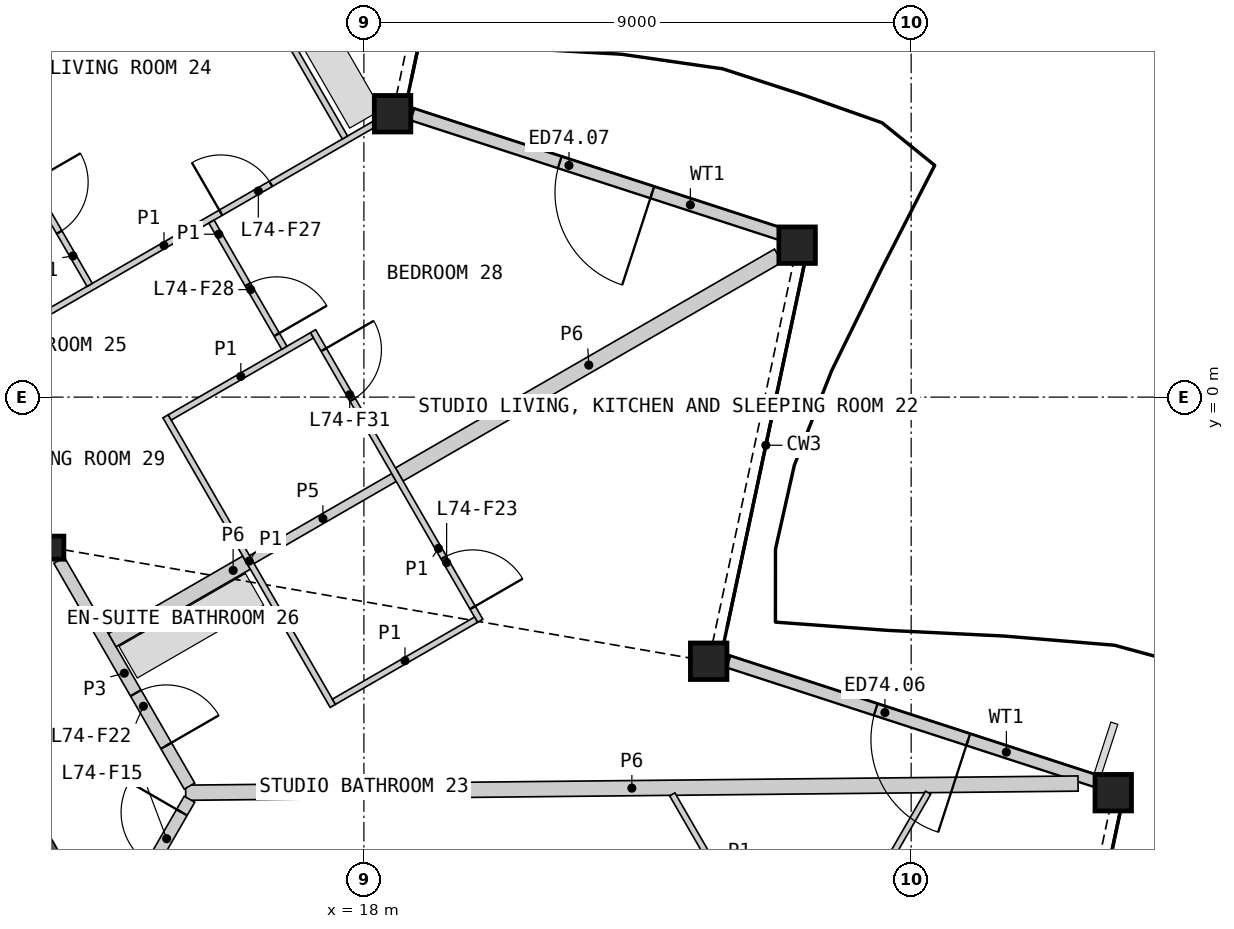
"""IFC4 building model, lengths in metres.
Left out: names, types, materials, properties, quantities, classifications, styles, units other than length and angle.
Written with IfcOpenShell. Run it as: python <this file> out.ifc"""

import sys

from ifc_helpers import new_model, si_unit, direction, frame, frame_2d, origin, origin_2d, place, context, subcontext, project, spatial, polyline, rectangle, hollow_rectangle, i_section, outline, extrude, element, fill, save


model = new_model("IFC4")
c1 = context("Model", 3, precision=1e-05, world=origin(), true_north=direction((0.0, 1.0)))
c2 = subcontext(c1, "Body", "Model", "MODEL_VIEW")
j1 = project(units=[si_unit("LENGTHUNIT", "METRE"), si_unit("PLANEANGLEUNIT", "RADIAN")], contexts=[c1])
p1 = place(None, origin())
s1 = spatial("IfcSite", under=j1, at=p1, CompositionType="ELEMENT")
p2 = place(p1, origin())
s2 = spatial("IfcBuilding", under=s1, at=p2, CompositionType="ELEMENT")
p3 = place(p2, frame((0.0, 0.0, 332.4)))
s3 = spatial("IfcBuildingStorey", under=s2, at=p3, CompositionType="ELEMENT", Elevation=332.4)
for number, where, z_axis, x_axis in (
    (1, (30.324, -6.506, 0.0), (0.0, 0.0, 1.0), (1.0, 0.0, 0.0)),
    (2, (23.67, -4.344, 0.0), (0.0, 0.0, 1.0), (1.0, 0.0, 0.0)),
    (3, (25.125, 2.499, 0.0), (0.0, 0.0, 1.0), (1.0, 0.0, 0.0)),
    (4, (18.471, 4.661, 0.0), (0.0, 0.0, 1.0), (1.0, 0.0, 0.0)),
):
    element("IfcColumn", number, at=place(p3, frame(where, z_axis=z_axis, x_axis=x_axis)), inside=s3, PredefinedType="COLUMN", context=c2, shape_type="SweptSolid", body=[
        extrude(hollow_rectangle(XDim=0.6, YDim=0.6, WallThickness=0.04, at=origin_2d()), origin(), (0.0, 0.0, 1.0), 3.4),
    ])
p4 = place(p3, frame((12.868, -2.476, 0.0), z_axis=(0.0, 0.0, 1.0), x_axis=(1.0, 0.0, 0.0)))
e5 = element("IfcColumn", 5, at=p4, inside=s3, PredefinedType="COLUMN", context=c2, shape_type="SweptSolid", body=[
    extrude(i_section(OverallWidth=0.396, OverallDepth=0.381, WebThickness=0.019, FlangeThickness=0.03, at=origin_2d()), origin(), (0.0, 0.0, 1.0), 3.4),
])
p5 = place(p3, frame((30.09, -6.333, 0.0), z_axis=(0.0, 0.0, 1.0), x_axis=(-0.951048625867, 0.309041277561, 0.0)))
e6 = element("IfcWall", 6, at=p5, inside=s3, PredefinedType="SOLIDWALL", context=c2, shape_type="SweptSolid", body=[
    extrude(rectangle(XDim=6.408, YDim=0.2, at=frame_2d((3.204, 0.0))), origin(), (0.0, 0.0, 1.0), 2.488),
])
p6 = place(p5, frame((2.262, 0.0, 0.0)))
e7 = element("IfcOpeningElement", 7, at=p6, cuts=e6, PredefinedType="OPENING", context=c2, shape_type="SweptSolid", body=[
    extrude(rectangle(XDim=1.6, YDim=2.25, at=frame_2d((0.8, 1.125))), frame((0.0, 0.11, 0.0), z_axis=(0.0, -1.0, 0.0), x_axis=(1.0, 0.0, 0.0)), (0.0, 0.0, 1.0), 0.22),
])
p7 = place(p3, frame((24.893, 2.667, 0.0), z_axis=(0.0, 0.0, 1.0), x_axis=(-0.951058691075, 0.309010301012, 0.0)))
e8 = element("IfcWall", 8, at=p7, inside=s3, PredefinedType="SOLIDWALL", context=c2, shape_type="SweptSolid", body=[
    extrude(rectangle(XDim=6.411, YDim=0.2, at=frame_2d((3.206, 0.0))), origin(), (0.0, 0.0, 1.0), 2.488),
])
p8 = place(p7, frame((2.262, 0.0, 0.0)))
e9 = element("IfcOpeningElement", 9, at=p8, cuts=e8, PredefinedType="OPENING", context=c2, shape_type="SweptSolid", body=[
    extrude(rectangle(XDim=1.6, YDim=2.25, at=frame_2d((0.8, 1.125))), frame((0.0, 0.11, 0.0), z_axis=(0.0, -1.0, 0.0), x_axis=(1.0, 0.0, 0.0)), (0.0, 0.0, 1.0), 0.22),
])
p9 = place(p3, origin())
e10 = element("IfcWall", 10, at=p9, inside=s3, PredefinedType="SHEAR", context=c2, shape_type="SweptSolid", body=[
    extrude(outline(polyline([(11.961, -7.506), (11.961, -6.906), (12.48, -6.606), (13.0, -7.506), (11.961, -7.506)])), origin(), (0.0, 0.0, 1.0), 3.1),
])
p10 = place(p3, frame((15.069, -6.507, 0.0), z_axis=(0.0, 0.0, 1.0), x_axis=(0.999946985532, 0.010296898856, 0.0)))
e11 = element("IfcWall", 11, at=p10, inside=s3, PredefinedType="PARTITIONING", context=c2, shape_type="SweptSolid", body=[
    extrude(rectangle(XDim=14.677, YDim=0.25, at=frame_2d((7.338, 0.0))), origin(), (0.0, 0.0, 1.0), 2.33),
])
p11 = place(p3, frame((18.581, -1.272, 0.0), z_axis=(0.0, 0.0, 1.0), x_axis=(0.866024038922, 0.500002364004, 0.0)))
e12 = element("IfcWall", 12, at=p11, inside=s3, PredefinedType="PARTITIONING", context=c2, shape_type="SweptSolid", body=[
    extrude(rectangle(XDim=7.198, YDim=0.25, at=frame_2d((3.599, 0.0))), origin(), (0.0, 0.0, 1.0), 2.33),
])
p12 = place(p3, frame((12.988, -2.684, 0.0), z_axis=(0.0, 0.0, 1.0), x_axis=(0.500003406062, -0.866023437285, 0.0)))
e13 = element("IfcWall", 13, at=p12, inside=s3, PredefinedType="PARTITIONING", context=c2, shape_type="SweptSolid", body=[
    extrude(rectangle(XDim=4.288, YDim=0.2, at=frame_2d((2.144, 0.0))), origin(), (0.0, 0.0, 1.0), 3.1),
])
p13 = place(p12, frame((2.521, 0.0, 0.0)))
e14 = element("IfcOpeningElement", 14, at=p13, cuts=e13, PredefinedType="OPENING", context=c2, shape_type="SweptSolid", body=[
    extrude(rectangle(XDim=1.0, YDim=2.1, at=frame_2d((0.5, 1.05))), frame((0.0, 0.11, 0.0), z_axis=(0.0, -1.0, 0.0), x_axis=(1.0, 0.0, 0.0)), (0.0, 0.0, 1.0), 0.22),
])
p14 = place(p3, frame((13.293, -9.797, 0.0), z_axis=(0.0, 0.0, 1.0), x_axis=(0.499967746641, 0.866044024469, 0.0)))
e15 = element("IfcWall", 15, at=p14, inside=s3, PredefinedType="PARTITIONING", context=c2, shape_type="SweptSolid", body=[
    extrude(rectangle(XDim=3.676, YDim=0.2, at=frame_2d((1.838, 0.0))), origin(), (0.0, 0.0, 1.0), 3.1),
])
p15 = place(p14, frame((2.426, 0.0, 0.0)))
e16 = element("IfcOpeningElement", 16, at=p15, cuts=e15, PredefinedType="OPENING", context=c2, shape_type="SweptSolid", body=[
    extrude(rectangle(XDim=1.0, YDim=2.1, at=frame_2d((0.5, 1.05))), frame((0.0, 0.11, 0.0), z_axis=(0.0, -1.0, 0.0), x_axis=(1.0, 0.0, 0.0)), (0.0, 0.0, 1.0), 0.22),
])
p16 = place(p3, frame((13.861, -3.997, 0.0), z_axis=(0.0, 0.0, 1.0), x_axis=(0.866030925526, 0.499990435942, 0.0)))
e17 = element("IfcWall", 17, at=p16, inside=s3, PredefinedType="PARTITIONING", context=c2, shape_type="SweptSolid", body=[
    extrude(rectangle(XDim=2.55, YDim=0.25, at=frame_2d((1.275, 0.0))), origin(), (0.0, 0.0, 1.0), 2.33),
])
p17 = place(p3, frame((16.156, -2.672, 0.0), z_axis=(0.0, 0.0, 1.0), x_axis=(0.866059108428, 0.4999416173, 0.0)))
e18 = element("IfcWall", 18, at=p17, inside=s3, PredefinedType="PLUMBINGWALL", context=c2, shape_type="SweptSolid", body=[
    extrude(rectangle(XDim=2.7, YDim=0.15, at=frame_2d((1.35, 0.0))), origin(), (0.0, 0.0, 1.0), 2.33),
])
p18 = place(p3, frame((8.786, 5.073, 0.0), z_axis=(0.0, 0.0, 1.0), x_axis=(0.86602139559, 0.500006942333, 0.0)))
e19 = element("IfcWall", 19, at=p18, inside=s3, PredefinedType="PARTITIONING", context=c2, shape_type="SweptSolid", body=[
    extrude(rectangle(XDim=12.505, YDim=0.1, at=frame_2d((6.252, 0.0))), origin(), (0.0, 0.0, 1.0), 2.33),
])
p19 = place(p18, frame((5.275, 0.0, 0.0)))
e20 = element("IfcOpeningElement", 20, at=p19, cuts=e19, PredefinedType="OPENING", context=c2, shape_type="SweptSolid", body=[
    extrude(rectangle(XDim=0.95, YDim=2.1, at=frame_2d((0.475, 1.05))), frame((0.0, 0.06, 0.0), z_axis=(0.0, -1.0, 0.0), x_axis=(1.0, 0.0, 0.0)), (0.0, 0.0, 1.0), 0.12),
])
p20 = place(p3, frame((11.263, 0.503, 0.0), z_axis=(0.0, 0.0, 1.0), x_axis=(0.866023773276, 0.500002824113, 0.0)))
e21 = element("IfcWall", 21, at=p20, inside=s3, PredefinedType="PARTITIONING", context=c2, shape_type="SweptSolid", body=[
    extrude(rectangle(XDim=7.965, YDim=0.1, at=frame_2d((3.982, 0.0))), origin(), (0.0, 0.0, 1.0), 2.33),
])
p21 = place(p20, frame((5.061, 0.0, 0.0)))
e22 = element("IfcOpeningElement", 22, at=p21, cuts=e21, PredefinedType="OPENING", context=c2, shape_type="SweptSolid", body=[
    extrude(rectangle(XDim=0.95, YDim=2.1, at=frame_2d((0.475, 1.05))), frame((0.0, 0.06, 0.0), z_axis=(0.0, -1.0, 0.0), x_axis=(1.0, 0.0, 0.0)), (0.0, 0.0, 1.0), 0.12),
])
p22 = place(p3, frame((23.301, -13.395, 0.0), z_axis=(0.0, 0.0, 1.0), x_axis=(0.500017325895, 0.866015400443, 0.0)))
e23 = element("IfcWall", 23, at=p22, inside=s3, PredefinedType="PARTITIONING", context=c2, shape_type="SweptSolid", body=[
    extrude(rectangle(XDim=7.955, YDim=0.1, at=frame_2d((3.978, 0.0))), origin(), (0.0, 0.0, 1.0), 2.33),
])
p23 = place(p22, frame((1.951, 0.0, 0.0)))
e24 = element("IfcOpeningElement", 24, at=p23, cuts=e23, PredefinedType="OPENING", context=c2, shape_type="SweptSolid", body=[
    extrude(rectangle(XDim=0.95, YDim=2.1, at=frame_2d((0.475, 1.05))), frame((0.0, 0.06, 0.0), z_axis=(0.0, -1.0, 0.0), x_axis=(1.0, 0.0, 0.0)), (0.0, 0.0, 1.0), 0.12),
])
p24 = place(p3, frame((14.738, -0.316, 0.0), z_axis=(0.0, 0.0, 1.0), x_axis=(0.499996545922, -0.866027397988, 0.0)))
e25 = element("IfcWall", 25, at=p24, inside=s3, PredefinedType="PARTITIONING", context=c2, shape_type="SweptSolid", body=[
    extrude(rectangle(XDim=5.5, YDim=0.1, at=frame_2d((2.75, 0.0))), origin(), (0.0, 0.0, 1.0), 2.33),
])
p25 = place(p3, frame((17.163, 1.084, 0.0), z_axis=(0.0, 0.0, 1.0), x_axis=(0.500015767406, -0.866016300277, 0.0)))
e26 = element("IfcWall", 26, at=p25, inside=s3, PredefinedType="PARTITIONING", context=c2, shape_type="SweptSolid", body=[
    extrude(rectangle(XDim=5.5, YDim=0.1, at=frame_2d((2.75, 0.0))), origin(), (0.0, 0.0, 1.0), 2.33),
])
p26 = place(p25, frame((4.3, 0.0, 0.0)))
e27 = element("IfcOpeningElement", 27, at=p26, cuts=e26, PredefinedType="OPENING", context=c2, shape_type="SweptSolid", body=[
    extrude(rectangle(XDim=0.95, YDim=2.1, at=frame_2d((0.475, 1.05))), frame((0.0, 0.06, 0.0), z_axis=(0.0, -1.0, 0.0), x_axis=(1.0, 0.0, 0.0)), (0.0, 0.0, 1.0), 0.12),
])
p27 = place(p25, frame((0.351, 0.0, 0.0)))
e28 = element("IfcOpeningElement", 28, at=p27, cuts=e26, PredefinedType="OPENING", context=c2, shape_type="SweptSolid", body=[
    extrude(rectangle(XDim=0.95, YDim=2.1, at=frame_2d((0.475, 1.05))), frame((0.0, 0.06, 0.0), z_axis=(0.0, -1.0, 0.0), x_axis=(1.0, 0.0, 0.0)), (0.0, 0.0, 1.0), 0.12),
])
p28 = place(p3, frame((15.14, 8.683, 0.0), z_axis=(0.0, 0.0, 1.0), x_axis=(0.499987849973, -0.866032418492, 0.0)))
e29 = element("IfcWall", 29, at=p28, inside=s3, PredefinedType="PARTITIONING", context=c2, shape_type="SweptSolid", body=[
    extrude(rectangle(XDim=5.096, YDim=0.1, at=frame_2d((2.548, 0.0))), origin(), (0.0, 0.0, 1.0), 2.33),
])
p29 = place(p28, frame((0.554, 0.0, 0.0)))
e30 = element("IfcOpeningElement", 30, at=p29, cuts=e29, PredefinedType="OPENING", context=c2, shape_type="SweptSolid", body=[
    extrude(rectangle(XDim=0.95, YDim=2.1, at=frame_2d((0.475, 1.05))), frame((0.0, 0.06, 0.0), z_axis=(0.0, -1.0, 0.0), x_axis=(1.0, 0.0, 0.0)), (0.0, 0.0, 1.0), 0.12),
])
p30 = place(p3, frame((23.072, -6.533, 0.0), z_axis=(0.0, 0.0, 1.0), x_axis=(0.500009026289, -0.866020192391, 0.0)))
e31 = element("IfcWall", 31, at=p30, inside=s3, PredefinedType="PARTITIONING", context=c2, shape_type="SweptSolid", body=[
    extrude(rectangle(XDim=2.999, YDim=0.1, at=frame_2d((1.5, 0.0))), origin(), (0.0, 0.0, 1.0), 2.33),
])
for number, where, z_axis, x_axis in (
    (32, (17.506, -5.011, 0.0), (0.0, 0.0, 1.0), (0.866, 0.5, 0.0)),
    (33, (14.806, -0.334, 0.0), (0.0, 0.0, 1.0), (0.866, 0.5, 0.0)),
):
    element("IfcWall", number, at=place(p3, frame(where, z_axis=z_axis, x_axis=x_axis)), inside=s3, PredefinedType="PARTITIONING", context=c2, shape_type="SweptSolid", body=[
        extrude(rectangle(XDim=2.7, YDim=0.1, at=frame_2d((1.35, 0.0))), origin(), (0.0, 0.0, 1.0), 2.33),
    ])
p31 = place(p3, frame((15.493, 2.887, 0.0), z_axis=(0.0, 0.0, 1.0), x_axis=(0.499963527173, -0.866046460357, 0.0)))
e34 = element("IfcWall", 34, at=p31, inside=s3, PredefinedType="PARTITIONING", context=c2, shape_type="SweptSolid", body=[
    extrude(rectangle(XDim=2.396, YDim=0.1, at=frame_2d((1.198, 0.0))), origin(), (0.0, 0.0, 1.0), 2.33),
])
p32 = place(p31, frame((1.196, 0.0, 0.0)))
e35 = element("IfcOpeningElement", 35, at=p32, cuts=e34, PredefinedType="OPENING", context=c2, shape_type="SweptSolid", body=[
    extrude(rectangle(XDim=0.95, YDim=2.1, at=frame_2d((0.475, 1.05))), frame((0.0, 0.06, 0.0), z_axis=(0.0, -1.0, 0.0), x_axis=(1.0, 0.0, 0.0)), (0.0, 0.0, 1.0), 0.12),
])
p33 = place(p3, frame((12.39, 3.751, 0.0), z_axis=(0.0, 0.0, 1.0), x_axis=(0.50002983664, -0.866008176907, 0.0)))
e36 = element("IfcWall", 36, at=p33, inside=s3, PredefinedType="PARTITIONING", context=c2, shape_type="SweptSolid", body=[
    extrude(rectangle(XDim=2.2, YDim=0.1, at=frame_2d((1.1, 0.0))), origin(), (0.0, 0.0, 1.0), 2.33),
])
p34 = place(p33, frame((0.25, 0.0, 0.0)))
e37 = element("IfcOpeningElement", 37, at=p34, cuts=e36, PredefinedType="OPENING", context=c2, shape_type="SweptSolid", body=[
    extrude(rectangle(XDim=0.95, YDim=2.1, at=frame_2d((0.475, 1.05))), frame((0.0, 0.06, 0.0), z_axis=(0.0, -1.0, 0.0), x_axis=(1.0, 0.0, 0.0)), (0.0, 0.0, 1.0), 0.12),
])
p35 = place(p6, origin())
e38 = element("IfcDoor", 38, at=p35, inside=s3, OperationType="DOUBLE_DOOR_SINGLE_SWING", PredefinedType="DOOR", context=c2, shape_type="SweptSolid", body=[
    extrude(rectangle(XDim=1.6, YDim=2.25, at=frame_2d((0.8, 1.125))), frame((0.0, 0.025, 0.0), z_axis=(0.0, -1.0, 0.0), x_axis=(1.0, 0.0, 0.0)), (0.0, 0.0, 1.0), 0.05),
])
fill(e7, e38)
p36 = place(p8, origin())
e39 = element("IfcDoor", 39, at=p36, inside=s3, OperationType="DOUBLE_DOOR_SINGLE_SWING", PredefinedType="DOOR", context=c2, shape_type="SweptSolid", body=[
    extrude(rectangle(XDim=1.6, YDim=2.25, at=frame_2d((0.8, 1.125))), frame((0.0, 0.025, 0.0), z_axis=(0.0, -1.0, 0.0), x_axis=(1.0, 0.0, 0.0)), (0.0, 0.0, 1.0), 0.05),
])
fill(e9, e39)
p37 = place(p15, origin())
e40 = element("IfcDoor", 40, at=p37, inside=s3, OperationType="SINGLE_SWING_RIGHT", PredefinedType="DOOR", context=c2, shape_type="SweptSolid", body=[
    extrude(rectangle(XDim=1.0, YDim=2.1, at=frame_2d((0.5, 1.05))), frame((0.0, 0.025, 0.0), z_axis=(0.0, -1.0, 0.0), x_axis=(1.0, 0.0, 0.0)), (0.0, 0.0, 1.0), 0.05),
])
fill(e16, e40)
p38 = place(p13, origin())
e41 = element("IfcDoor", 41, at=p38, inside=s3, OperationType="SINGLE_SWING_RIGHT", PredefinedType="DOOR", context=c2, shape_type="SweptSolid", body=[
    extrude(rectangle(XDim=1.0, YDim=2.1, at=frame_2d((0.5, 1.05))), frame((0.0, 0.025, 0.0), z_axis=(0.0, -1.0, 0.0), x_axis=(1.0, 0.0, 0.0)), (0.0, 0.0, 1.0), 0.05),
])
fill(e14, e41)
p39 = place(p26, origin())
e42 = element("IfcDoor", 42, at=p39, inside=s3, OperationType="SINGLE_SWING_RIGHT", PredefinedType="DOOR", context=c2, shape_type="SweptSolid", body=[
    extrude(rectangle(XDim=0.95, YDim=2.1, at=frame_2d((0.475, 1.05))), frame((0.0, 0.025, 0.0), z_axis=(0.0, -1.0, 0.0), x_axis=(1.0, 0.0, 0.0)), (0.0, 0.0, 1.0), 0.05),
])
fill(e27, e42)
p40 = place(p34, origin())
e43 = element("IfcDoor", 43, at=p40, inside=s3, OperationType="SINGLE_SWING_LEFT", PredefinedType="DOOR", context=c2, shape_type="SweptSolid", body=[
    extrude(rectangle(XDim=0.95, YDim=2.1, at=frame_2d((0.475, 1.05))), frame((0.0, 0.025, 0.0), z_axis=(0.0, -1.0, 0.0), x_axis=(1.0, 0.0, 0.0)), (0.0, 0.0, 1.0), 0.05),
])
fill(e37, e43)
p41 = place(p21, origin())
e44 = element("IfcDoor", 44, at=p41, inside=s3, OperationType="SINGLE_SWING_LEFT", PredefinedType="DOOR", context=c2, shape_type="SweptSolid", body=[
    extrude(rectangle(XDim=0.95, YDim=2.1, at=frame_2d((0.475, 1.05))), frame((0.0, 0.025, 0.0), z_axis=(0.0, -1.0, 0.0), x_axis=(1.0, 0.0, 0.0)), (0.0, 0.0, 1.0), 0.05),
])
fill(e22, e44)
p42 = place(p32, origin())
e45 = element("IfcDoor", 45, at=p42, inside=s3, OperationType="SINGLE_SWING_RIGHT", PredefinedType="DOOR", context=c2, shape_type="SweptSolid", body=[
    extrude(rectangle(XDim=0.95, YDim=2.1, at=frame_2d((0.475, 1.05))), frame((0.0, 0.025, 0.0), z_axis=(0.0, -1.0, 0.0), x_axis=(1.0, 0.0, 0.0)), (0.0, 0.0, 1.0), 0.05),
])
fill(e35, e45)
p43 = place(p27, origin())
e46 = element("IfcDoor", 46, at=p43, inside=s3, OperationType="SINGLE_SWING_LEFT", PredefinedType="DOOR", context=c2, shape_type="SweptSolid", body=[
    extrude(rectangle(XDim=0.95, YDim=2.1, at=frame_2d((0.475, 1.05))), frame((0.0, 0.025, 0.0), z_axis=(0.0, -1.0, 0.0), x_axis=(1.0, 0.0, 0.0)), (0.0, 0.0, 1.0), 0.05),
])
fill(e28, e46)
save(model, sys.argv[1])
